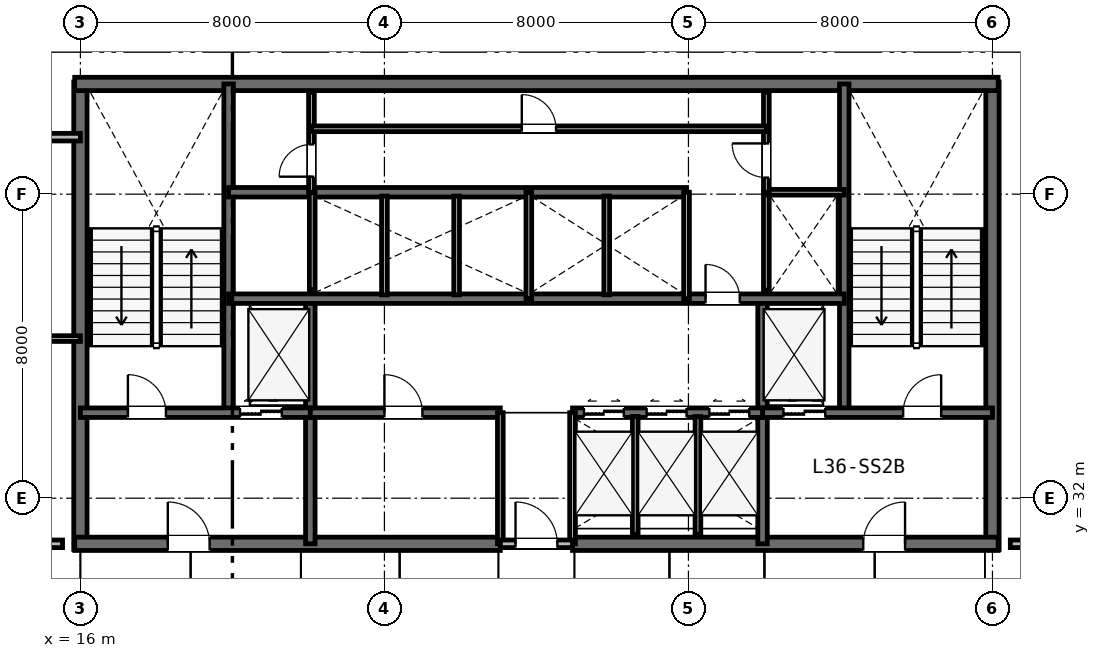
"""IFC4 building model, lengths in metres.
Left out: names, types, materials, properties, quantities, classifications, styles, units other than length and angle.
Written with IfcOpenShell. Run it as: python <this file> out.ifc"""

import sys

from ifc_helpers import new_model, si_unit, direction, frame, frame_2d, origin, place, context, subcontext, project, spatial, rectangle, extrude, element, fill, save


model = new_model("IFC4")
c1 = context("Model", 3, precision=1e-05, world=origin(), true_north=direction((0.0, 1.0)))
c2 = subcontext(c1, "Body", "Model", "MODEL_VIEW")
j1 = project(units=[si_unit("LENGTHUNIT", "METRE"), si_unit("PLANEANGLEUNIT", "RADIAN")], contexts=[c1])
p1 = place(None, origin())
s1 = spatial("IfcSite", under=j1, at=p1, CompositionType="ELEMENT")
p2 = place(p1, origin())
s2 = spatial("IfcBuilding", under=s1, at=p2, CompositionType="ELEMENT")
p3 = place(p2, frame((0.0, 0.0, 140.4)))
s3 = spatial("IfcBuildingStorey", under=s2, at=p3, CompositionType="ELEMENT", Elevation=140.4)
for number, where, z_axis, x_axis in (
    (1, (16.0, 30.65, 0.0), (0.0, 0.0, 1.0), (0.0, 1.0, 0.0)),
    (2, (40.0, 30.65, 0.0), (0.0, 0.0, 1.0), (0.0, 1.0, 0.0)),
):
    element("IfcWall", number, at=place(p3, frame(where, z_axis=z_axis, x_axis=x_axis)), inside=s3, PredefinedType="SHEAR", context=c2, shape_type="SweptSolid", body=[
        extrude(rectangle(XDim=12.3, YDim=0.35, at=frame_2d((6.15, 0.0))), origin(), (0.0, 0.0, 1.0), 3.6),
    ])
p4 = place(p3, frame((15.85, 42.9, 0.0), z_axis=(0.0, 0.0, 1.0), x_axis=(1.0, 0.0, 0.0)))
e3 = element("IfcWall", 3, at=p4, inside=s3, PredefinedType="SHEAR", context=c2, shape_type="SweptSolid", body=[
    extrude(rectangle(XDim=24.3, YDim=0.35, at=frame_2d((12.15, 0.0))), origin(), (0.0, 0.0, 1.0), 3.6),
])
p5 = place(p3, frame((15.85, 30.8, 0.0), z_axis=(0.0, 0.0, 1.0), x_axis=(1.0, 0.0, 0.0)))
e4 = element("IfcWall", 4, at=p5, inside=s3, PredefinedType="SHEAR", context=c2, shape_type="SweptSolid", body=[
    extrude(rectangle(XDim=11.2, YDim=0.35, at=frame_2d((5.6, 0.0))), origin(), (0.0, 0.0, 1.0), 3.6),
])
p6 = place(p5, frame((2.45, 0.0, 0.0)))
e5 = element("IfcOpeningElement", 5, at=p6, cuts=e4, PredefinedType="OPENING", context=c2, shape_type="SweptSolid", body=[
    extrude(rectangle(XDim=1.1, YDim=2.15, at=frame_2d((0.55, 1.075))), frame((0.0, 0.185, 0.0), z_axis=(0.0, -1.0, 0.0), x_axis=(1.0, 0.0, 0.0)), (0.0, 0.0, 1.0), 0.37),
])
p7 = place(p3, frame((28.95, 30.8, 0.0), z_axis=(0.0, 0.0, 1.0), x_axis=(1.0, 0.0, 0.0)))
e6 = element("IfcWall", 6, at=p7, inside=s3, PredefinedType="SHEAR", context=c2, shape_type="SweptSolid", body=[
    extrude(rectangle(XDim=11.2, YDim=0.35, at=frame_2d((5.6, 0.0))), origin(), (0.0, 0.0, 1.0), 3.6),
])
p8 = place(p7, frame((7.65, 0.0, 0.0)))
e7 = element("IfcOpeningElement", 7, at=p8, cuts=e6, PredefinedType="OPENING", context=c2, shape_type="SweptSolid", body=[
    extrude(rectangle(XDim=1.1, YDim=2.15, at=frame_2d((0.55, 1.075))), frame((0.0, 0.185, 0.0), z_axis=(0.0, -1.0, 0.0), x_axis=(1.0, 0.0, 0.0)), (0.0, 0.0, 1.0), 0.37),
])
for number, where, z_axis, x_axis in (
    (8, (19.9, 34.25, 0.0), (0.0, 0.0, 1.0), (0.0, 1.0, 0.0)),
    (9, (36.1, 34.25, 0.0), (0.0, 0.0, 1.0), (0.0, 1.0, 0.0)),
):
    element("IfcWall", number, at=place(p3, frame(where, z_axis=z_axis, x_axis=x_axis)), inside=s3, PredefinedType="SHEAR", context=c2, shape_type="SweptSolid", body=[
        extrude(rectangle(XDim=8.65, YDim=0.25, at=frame_2d((4.325, 0.0))), origin(), (0.0, 0.0, 1.0), 3.6),
    ])
for number, where, z_axis, x_axis in (
    (10, (22.05, 30.8, 0.0), (0.0, 0.0, 1.0), (0.0, 1.0, 0.0)),
    (11, (33.95, 30.8, 0.0), (0.0, 0.0, 1.0), (0.0, 1.0, 0.0)),
):
    element("IfcWall", number, at=place(p3, frame(where, z_axis=z_axis, x_axis=x_axis)), inside=s3, PredefinedType="SHEAR", context=c2, shape_type="SweptSolid", body=[
        extrude(rectangle(XDim=6.45, YDim=0.25, at=frame_2d((3.225, 0.0))), origin(), (0.0, 0.0, 1.0), 3.6),
    ])
p9 = place(p3, frame((16.0, 34.25, 0.0), z_axis=(0.0, 0.0, 1.0), x_axis=(1.0, 0.0, 0.0)))
e12 = element("IfcWall", 12, at=p9, inside=s3, PredefinedType="SHEAR", context=c2, shape_type="SweptSolid", body=[
    extrude(rectangle(XDim=6.05, YDim=0.25, at=frame_2d((3.025, 0.0))), origin(), (0.0, 0.0, 1.0), 3.6),
])
p10 = place(p9, frame((1.25, 0.0, 0.0)))
e13 = element("IfcOpeningElement", 13, at=p10, cuts=e12, PredefinedType="OPENING", context=c2, shape_type="SweptSolid", body=[
    extrude(rectangle(XDim=1.0, YDim=2.15, at=frame_2d((0.5, 1.075))), frame((0.0, 0.135, 0.0), z_axis=(0.0, -1.0, 0.0), x_axis=(1.0, 0.0, 0.0)), (0.0, 0.0, 1.0), 0.27),
])
p11 = place(p9, frame((4.2, 0.0, 0.0)))
e14 = element("IfcOpeningElement", 14, at=p11, cuts=e12, PredefinedType="OPENING", context=c2, shape_type="SweptSolid", body=[
    extrude(rectangle(XDim=1.1, YDim=2.15, at=frame_2d((0.55, 1.075))), frame((0.0, 0.135, 0.0), z_axis=(0.0, -1.0, 0.0), x_axis=(1.0, 0.0, 0.0)), (0.0, 0.0, 1.0), 0.27),
])
p12 = place(p3, frame((33.95, 34.25, 0.0), z_axis=(0.0, 0.0, 1.0), x_axis=(1.0, 0.0, 0.0)))
e15 = element("IfcWall", 15, at=p12, inside=s3, PredefinedType="SHEAR", context=c2, shape_type="SweptSolid", body=[
    extrude(rectangle(XDim=6.05, YDim=0.25, at=frame_2d((3.025, 0.0))), origin(), (0.0, 0.0, 1.0), 3.6),
])
p13 = place(p12, frame((3.7, 0.0, 0.0)))
e16 = element("IfcOpeningElement", 16, at=p13, cuts=e15, PredefinedType="OPENING", context=c2, shape_type="SweptSolid", body=[
    extrude(rectangle(XDim=1.0, YDim=2.15, at=frame_2d((0.5, 1.075))), frame((0.0, 0.135, 0.0), z_axis=(0.0, -1.0, 0.0), x_axis=(1.0, 0.0, 0.0)), (0.0, 0.0, 1.0), 0.27),
])
p14 = place(p12, frame((0.55, 0.0, 0.0)))
e17 = element("IfcOpeningElement", 17, at=p14, cuts=e15, PredefinedType="OPENING", context=c2, shape_type="SweptSolid", body=[
    extrude(rectangle(XDim=1.1, YDim=2.15, at=frame_2d((0.55, 1.075))), frame((0.0, 0.135, 0.0), z_axis=(0.0, -1.0, 0.0), x_axis=(1.0, 0.0, 0.0)), (0.0, 0.0, 1.0), 0.27),
])
p15 = place(p3, frame((22.05, 34.25, 0.0), z_axis=(0.0, 0.0, 1.0), x_axis=(1.0, 0.0, 0.0)))
e18 = element("IfcWall", 18, at=p15, inside=s3, PredefinedType="SHEAR", context=c2, shape_type="SweptSolid", body=[
    extrude(rectangle(XDim=5.0, YDim=0.25, at=frame_2d((2.5, 0.0))), origin(), (0.0, 0.0, 1.0), 3.6),
])
p16 = place(p15, frame((1.95, 0.0, 0.0)))
e19 = element("IfcOpeningElement", 19, at=p16, cuts=e18, PredefinedType="OPENING", context=c2, shape_type="SweptSolid", body=[
    extrude(rectangle(XDim=1.0, YDim=2.15, at=frame_2d((0.5, 1.075))), frame((0.0, 0.135, 0.0), z_axis=(0.0, -1.0, 0.0), x_axis=(1.0, 0.0, 0.0)), (0.0, 0.0, 1.0), 0.27),
])
p17 = place(p3, frame((28.95, 34.25, 0.0), z_axis=(0.0, 0.0, 1.0), x_axis=(1.0, 0.0, 0.0)))
e20 = element("IfcWall", 20, at=p17, inside=s3, PredefinedType="SHEAR", context=c2, shape_type="SweptSolid", body=[
    extrude(rectangle(XDim=5.0, YDim=0.25, at=frame_2d((2.5, 0.0))), origin(), (0.0, 0.0, 1.0), 3.6),
])
p18 = place(p17, frame((0.3, 0.0, 0.0)))
e21 = element("IfcOpeningElement", 21, at=p18, cuts=e20, PredefinedType="OPENING", context=c2, shape_type="SweptSolid", body=[
    extrude(rectangle(XDim=1.05, YDim=2.15, at=frame_2d((0.525, 1.075))), frame((0.0, 0.135, 0.0), z_axis=(0.0, -1.0, 0.0), x_axis=(1.0, 0.0, 0.0)), (0.0, 0.0, 1.0), 0.27),
])
p19 = place(p17, frame((1.95, 0.0, 0.0)))
e22 = element("IfcOpeningElement", 22, at=p19, cuts=e20, PredefinedType="OPENING", context=c2, shape_type="SweptSolid", body=[
    extrude(rectangle(XDim=1.05, YDim=2.15, at=frame_2d((0.525, 1.075))), frame((0.0, 0.135, 0.0), z_axis=(0.0, -1.0, 0.0), x_axis=(1.0, 0.0, 0.0)), (0.0, 0.0, 1.0), 0.27),
])
p20 = place(p17, frame((3.6, 0.0, 0.0)))
e23 = element("IfcOpeningElement", 23, at=p20, cuts=e20, PredefinedType="OPENING", context=c2, shape_type="SweptSolid", body=[
    extrude(rectangle(XDim=1.05, YDim=2.15, at=frame_2d((0.525, 1.075))), frame((0.0, 0.135, 0.0), z_axis=(0.0, -1.0, 0.0), x_axis=(1.0, 0.0, 0.0)), (0.0, 0.0, 1.0), 0.27),
])
p21 = place(p3, frame((19.9, 37.25, 0.0), z_axis=(0.0, 0.0, 1.0), x_axis=(1.0, 0.0, 0.0)))
e24 = element("IfcWall", 24, at=p21, inside=s3, PredefinedType="SHEAR", context=c2, shape_type="SweptSolid", body=[
    extrude(rectangle(XDim=16.2, YDim=0.25, at=frame_2d((8.1, 0.0))), origin(), (0.0, 0.0, 1.0), 3.6),
])
p22 = place(p21, frame((12.55, 0.0, 0.0)))
e25 = element("IfcOpeningElement", 25, at=p22, cuts=e24, PredefinedType="OPENING", context=c2, shape_type="SweptSolid", body=[
    extrude(rectangle(XDim=0.9, YDim=2.15, at=frame_2d((0.45, 1.075))), frame((0.0, 0.135, 0.0), z_axis=(0.0, -1.0, 0.0), x_axis=(1.0, 0.0, 0.0)), (0.0, 0.0, 1.0), 0.27),
])
p23 = place(p3, frame((19.9, 40.05, 0.0), z_axis=(0.0, 0.0, 1.0), x_axis=(1.0, 0.0, 0.0)))
e26 = element("IfcWall", 26, at=p23, inside=s3, PredefinedType="SHEAR", context=c2, shape_type="SweptSolid", body=[
    extrude(rectangle(XDim=12.05, YDim=0.25, at=frame_2d((6.025, 0.0))), origin(), (0.0, 0.0, 1.0), 3.6),
])
p24 = place(p3, frame((27.05, 30.8, 0.0), z_axis=(0.0, 0.0, 1.0), x_axis=(0.0, 1.0, 0.0)))
e27 = element("IfcWall", 27, at=p24, inside=s3, PredefinedType="PLUMBINGWALL", context=c2, shape_type="SweptSolid", body=[
    extrude(rectangle(XDim=3.45, YDim=0.15, at=frame_2d((1.725, 0.0))), origin(), (0.0, 0.0, 1.0), 2.87),
])
p25 = place(p3, frame((28.95, 30.8, 0.0), z_axis=(0.0, 0.0, 1.0), x_axis=(0.0, 1.0, 0.0)))
e28 = element("IfcWall", 28, at=p25, inside=s3, PredefinedType="PLUMBINGWALL", context=c2, shape_type="SweptSolid", body=[
    extrude(rectangle(XDim=3.45, YDim=0.15, at=frame_2d((1.725, 0.0))), origin(), (0.0, 0.0, 1.0), 3.24),
])
p26 = place(p3, frame((27.05, 30.8, 0.0), z_axis=(0.0, 0.0, 1.0), x_axis=(1.0, 0.0, 0.0)))
e29 = element("IfcWall", 29, at=p26, inside=s3, PredefinedType="PARTITIONING", context=c2, shape_type="SweptSolid", body=[
    extrude(rectangle(XDim=1.9, YDim=0.2, at=frame_2d((0.95, 0.0))), origin(), (0.0, 0.0, 1.0), 2.87),
])
p27 = place(p26, frame((0.4, 0.0, 0.0)))
e30 = element("IfcOpeningElement", 30, at=p27, cuts=e29, PredefinedType="OPENING", context=c2, shape_type="SweptSolid", body=[
    extrude(rectangle(XDim=1.1, YDim=2.15, at=frame_2d((0.55, 1.075))), frame((0.0, 0.11, 0.0), z_axis=(0.0, -1.0, 0.0), x_axis=(1.0, 0.0, 0.0)), (0.0, 0.0, 1.0), 0.22),
])
for number, where, z_axis, x_axis in (
    (31, (30.6, 31.05, 0.0), (0.0, 0.0, 1.0), (0.0, 1.0, 0.0)),
    (32, (32.25, 31.05, 0.0), (0.0, 0.0, 1.0), (0.0, 1.0, 0.0)),
):
    element("IfcWall", number, at=place(p3, frame(where, z_axis=z_axis, x_axis=x_axis)), inside=s3, PredefinedType="PLUMBINGWALL", context=c2, shape_type="SweptSolid", body=[
        extrude(rectangle(XDim=3.1, YDim=0.15, at=frame_2d((1.55, 0.0))), origin(), (0.0, 0.0, 1.0), 3.24),
    ])
p28 = place(p3, frame((22.1, 37.49, 0.0), z_axis=(0.0, 0.0, 1.0), x_axis=(0.0, 1.0, 0.0)))
e33 = element("IfcWall", 33, at=p28, inside=s3, PredefinedType="PLUMBINGWALL", context=c2, shape_type="SweptSolid", body=[
    extrude(rectangle(XDim=2.56, YDim=0.15, at=frame_2d((1.28, 0.0))), origin(), (0.0, 0.0, 1.0), 3.24),
])
p29 = place(p3, frame((27.8, 37.25, 0.0), z_axis=(0.0, 0.0, 1.0), x_axis=(0.0, 1.0, 0.0)))
e34 = element("IfcWall", 34, at=p29, inside=s3, PredefinedType="PLUMBINGWALL", context=c2, shape_type="SweptSolid", body=[
    extrude(rectangle(XDim=2.8, YDim=0.15, at=frame_2d((1.4, 0.0))), origin(), (0.0, 0.0, 1.0), 3.24),
])
for number, where, z_axis, x_axis in (
    (35, (24.0, 37.35, 0.0), (0.0, 0.0, 1.0), (0.0, 1.0, 0.0)),
    (36, (25.9, 37.35, 0.0), (0.0, 0.0, 1.0), (0.0, 1.0, 0.0)),
):
    element("IfcWall", number, at=place(p3, frame(where, z_axis=z_axis, x_axis=x_axis)), inside=s3, PredefinedType="PLUMBINGWALL", context=c2, shape_type="SweptSolid", body=[
        extrude(rectangle(XDim=2.6, YDim=0.15, at=frame_2d((1.3, 0.0))), origin(), (0.0, 0.0, 1.0), 3.24),
    ])
p30 = place(p3, frame((31.95, 37.25, 0.0), z_axis=(0.0, 0.0, 1.0), x_axis=(0.0, 1.0, 0.0)))
e37 = element("IfcWall", 37, at=p30, inside=s3, PredefinedType="PLUMBINGWALL", context=c2, shape_type="SweptSolid", body=[
    extrude(rectangle(XDim=2.8, YDim=0.15, at=frame_2d((1.4, 0.0))), origin(), (0.0, 0.0, 1.0), 3.24),
])
p31 = place(p3, frame((29.85, 37.35, 0.0), z_axis=(0.0, 0.0, 1.0), x_axis=(0.0, 1.0, 0.0)))
e38 = element("IfcWall", 38, at=p31, inside=s3, PredefinedType="PLUMBINGWALL", context=c2, shape_type="SweptSolid", body=[
    extrude(rectangle(XDim=2.6, YDim=0.15, at=frame_2d((1.3, 0.0))), origin(), (0.0, 0.0, 1.0), 3.24),
])
p32 = place(p3, frame((34.05, 37.473, 0.0), z_axis=(0.0, 0.0, 1.0), x_axis=(0.0, 1.0, 0.0)))
e39 = element("IfcWall", 39, at=p32, inside=s3, PredefinedType="PLUMBINGWALL", context=c2, shape_type="SweptSolid", body=[
    extrude(rectangle(XDim=2.577, YDim=0.15, at=frame_2d((1.288, 0.0))), origin(), (0.0, 0.0, 1.0), 3.24),
])
p33 = place(p3, frame((34.05, 40.05, 0.0), z_axis=(0.0, 0.0, 1.0), x_axis=(1.0, 0.0, 0.0)))
e40 = element("IfcWall", 40, at=p33, inside=s3, PredefinedType="PARTITIONING", context=c2, shape_type="SweptSolid", body=[
    extrude(rectangle(XDim=2.05, YDim=0.15, at=frame_2d((1.025, 0.0))), origin(), (0.0, 0.0, 1.0), 3.24),
])
p34 = place(p3, frame((34.05, 40.05, 0.0), z_axis=(0.0, 0.0, 1.0), x_axis=(0.0, 1.0, 0.0)))
e41 = element("IfcWall", 41, at=p34, inside=s3, PredefinedType="PARTITIONING", context=c2, shape_type="SweptSolid", body=[
    extrude(rectangle(XDim=2.63, YDim=0.15, at=frame_2d((1.315, 0.0))), origin(), (0.0, 0.0, 1.0), 3.24),
])
p35 = place(p34, frame((0.385, 0.0, 0.0)))
e42 = element("IfcOpeningElement", 42, at=p35, cuts=e41, PredefinedType="OPENING", context=c2, shape_type="SweptSolid", body=[
    extrude(rectangle(XDim=0.9, YDim=2.15, at=frame_2d((0.45, 1.075))), frame((0.0, 0.085, 0.0), z_axis=(0.0, -1.0, 0.0), x_axis=(1.0, 0.0, 0.0)), (0.0, 0.0, 1.0), 0.17),
])
p36 = place(p3, frame((22.08, 40.05, 0.0), z_axis=(0.0, 0.0, 1.0), x_axis=(0.0, 1.0, 0.0)))
e43 = element("IfcWall", 43, at=p36, inside=s3, PredefinedType="PARTITIONING", context=c2, shape_type="SweptSolid", body=[
    extrude(rectangle(XDim=2.63, YDim=0.15, at=frame_2d((1.315, 0.0))), origin(), (0.0, 0.0, 1.0), 3.24),
])
p37 = place(p36, frame((0.41, 0.0, 0.0)))
e44 = element("IfcOpeningElement", 44, at=p37, cuts=e43, PredefinedType="OPENING", context=c2, shape_type="SweptSolid", body=[
    extrude(rectangle(XDim=0.85, YDim=2.15, at=frame_2d((0.425, 1.075))), frame((0.0, 0.085, 0.0), z_axis=(0.0, -1.0, 0.0), x_axis=(1.0, 0.0, 0.0)), (0.0, 0.0, 1.0), 0.17),
])
p38 = place(p3, frame((22.08, 41.72, 0.0), z_axis=(0.0, 0.0, 1.0), x_axis=(1.0, 0.0, 0.0)))
e45 = element("IfcWall", 45, at=p38, inside=s3, PredefinedType="PARTITIONING", context=c2, shape_type="SweptSolid", body=[
    extrude(rectangle(XDim=11.97, YDim=0.15, at=frame_2d((5.985, 0.0))), origin(), (0.0, 0.0, 1.0), 3.24),
])
p39 = place(p38, frame((5.535, 0.0, 0.0)))
e46 = element("IfcOpeningElement", 46, at=p39, cuts=e45, PredefinedType="OPENING", context=c2, shape_type="SweptSolid", body=[
    extrude(rectangle(XDim=0.9, YDim=2.15, at=frame_2d((0.45, 1.075))), frame((0.0, 0.085, 0.0), z_axis=(0.0, -1.0, 0.0), x_axis=(1.0, 0.0, 0.0)), (0.0, 0.0, 1.0), 0.17),
])
p40 = place(p3, frame((11.4, 30.8, 0.0), z_axis=(0.0, 0.0, 1.0), x_axis=(1.0, 0.0, 0.0)))
e47 = element("IfcWall", 47, at=p40, inside=s3, PredefinedType="PARTITIONING", context=c2, shape_type="SweptSolid", body=[
    extrude(rectangle(XDim=4.13, YDim=0.2, at=frame_2d((2.065, 0.0))), origin(), (0.0, 0.0, 1.0), 2.84),
])
p41 = place(p3, frame((40.47, 30.8, 0.0), z_axis=(0.0, 0.0, 1.0), x_axis=(1.0, 0.0, 0.0)))
e48 = element("IfcWall", 48, at=p41, inside=s3, PredefinedType="PARTITIONING", context=c2, shape_type="SweptSolid", body=[
    extrude(rectangle(XDim=1.73, YDim=0.2, at=frame_2d((0.865, 0.0))), origin(), (0.0, 0.0, 1.0), 2.84),
])
p42 = place(p3, frame((0.1, 41.5, 0.0), z_axis=(0.0, 0.0, 1.0), x_axis=(1.0, 0.0, 0.0)))
e49 = element("IfcWall", 49, at=p42, inside=s3, PredefinedType="PARTITIONING", context=c2, shape_type="SweptSolid", body=[
    extrude(rectangle(XDim=15.9, YDim=0.2, at=frame_2d((7.95, 0.0))), origin(), (0.0, 0.0, 1.0), 2.84),
])
p43 = place(p42, frame((9.877, 0.0, 0.0)))
e50 = element("IfcOpeningElement", 50, at=p43, cuts=e49, PredefinedType="OPENING", context=c2, shape_type="SweptSolid", body=[
    extrude(rectangle(XDim=0.95, YDim=2.15, at=frame_2d((0.475, 1.075))), frame((0.0, 0.11, 0.0), z_axis=(0.0, -1.0, 0.0), x_axis=(1.0, 0.0, 0.0)), (0.0, 0.0, 1.0), 0.22),
])
p44 = place(p3, frame((11.4, 36.2, 0.0), z_axis=(0.0, 0.0, 1.0), x_axis=(1.0, 0.0, 0.0)))
e51 = element("IfcWall", 51, at=p44, inside=s3, PredefinedType="PARTITIONING", context=c2, shape_type="SweptSolid", body=[
    extrude(rectangle(XDim=4.6, YDim=0.15, at=frame_2d((2.3, 0.0))), origin(), (0.0, 0.0, 1.0), 3.24),
])
p45 = place(p27, origin())
e52 = element("IfcDoor", 52, at=p45, inside=s3, OperationType="SINGLE_SWING_LEFT", PredefinedType="DOOR", context=c2, shape_type="SweptSolid", body=[
    extrude(rectangle(XDim=1.1, YDim=2.15, at=frame_2d((0.55, 1.075))), frame((0.0, 0.025, 0.0), z_axis=(0.0, -1.0, 0.0), x_axis=(1.0, 0.0, 0.0)), (0.0, 0.0, 1.0), 0.05),
])
fill(e30, e52)
p46 = place(p10, origin())
e53 = element("IfcDoor", 53, at=p46, inside=s3, OperationType="SINGLE_SWING_LEFT", PredefinedType="DOOR", context=c2, shape_type="SweptSolid", body=[
    extrude(rectangle(XDim=1.0, YDim=2.15, at=frame_2d((0.5, 1.075))), frame((0.0, 0.025, 0.0), z_axis=(0.0, -1.0, 0.0), x_axis=(1.0, 0.0, 0.0)), (0.0, 0.0, 1.0), 0.05),
])
fill(e13, e53)
p47 = place(p13, origin())
e54 = element("IfcDoor", 54, at=p47, inside=s3, OperationType="SINGLE_SWING_RIGHT", PredefinedType="DOOR", context=c2, shape_type="SweptSolid", body=[
    extrude(rectangle(XDim=1.0, YDim=2.15, at=frame_2d((0.5, 1.075))), frame((0.0, 0.025, 0.0), z_axis=(0.0, -1.0, 0.0), x_axis=(1.0, 0.0, 0.0)), (0.0, 0.0, 1.0), 0.05),
])
fill(e16, e54)
p48 = place(p6, origin())
e55 = element("IfcDoor", 55, at=p48, inside=s3, OperationType="SINGLE_SWING_LEFT", PredefinedType="DOOR", context=c2, shape_type="SweptSolid", body=[
    extrude(rectangle(XDim=1.1, YDim=2.15, at=frame_2d((0.55, 1.075))), frame((0.0, 0.025, 0.0), z_axis=(0.0, -1.0, 0.0), x_axis=(1.0, 0.0, 0.0)), (0.0, 0.0, 1.0), 0.05),
])
fill(e5, e55)
p49 = place(p8, origin())
e56 = element("IfcDoor", 56, at=p49, inside=s3, OperationType="SINGLE_SWING_RIGHT", PredefinedType="DOOR", context=c2, shape_type="SweptSolid", body=[
    extrude(rectangle(XDim=1.1, YDim=2.15, at=frame_2d((0.55, 1.075))), frame((0.0, 0.025, 0.0), z_axis=(0.0, -1.0, 0.0), x_axis=(1.0, 0.0, 0.0)), (0.0, 0.0, 1.0), 0.05),
])
fill(e7, e56)
p50 = place(p16, origin())
e57 = element("IfcDoor", 57, at=p50, inside=s3, OperationType="SINGLE_SWING_LEFT", PredefinedType="DOOR", context=c2, shape_type="SweptSolid", body=[
    extrude(rectangle(XDim=1.0, YDim=2.15, at=frame_2d((0.5, 1.075))), frame((0.0, 0.025, 0.0), z_axis=(0.0, -1.0, 0.0), x_axis=(1.0, 0.0, 0.0)), (0.0, 0.0, 1.0), 0.05),
])
fill(e19, e57)
p51 = place(p22, origin())
e58 = element("IfcDoor", 58, at=p51, inside=s3, OperationType="SINGLE_SWING_LEFT", PredefinedType="DOOR", context=c2, shape_type="SweptSolid", body=[
    extrude(rectangle(XDim=0.9, YDim=2.15, at=frame_2d((0.45, 1.075))), frame((0.0, 0.025, 0.0), z_axis=(0.0, -1.0, 0.0), x_axis=(1.0, 0.0, 0.0)), (0.0, 0.0, 1.0), 0.05),
])
fill(e25, e58)
p52 = place(p35, origin())
e59 = element("IfcDoor", 59, at=p52, inside=s3, OperationType="SINGLE_SWING_RIGHT", PredefinedType="DOOR", context=c2, shape_type="SweptSolid", body=[
    extrude(rectangle(XDim=0.9, YDim=2.15, at=frame_2d((0.45, 1.075))), frame((0.0, 0.025, 0.0), z_axis=(0.0, -1.0, 0.0), x_axis=(1.0, 0.0, 0.0)), (0.0, 0.0, 1.0), 0.05),
])
fill(e42, e59)
p53 = place(p37, origin())
e60 = element("IfcDoor", 60, at=p53, inside=s3, OperationType="SINGLE_SWING_LEFT", PredefinedType="DOOR", context=c2, shape_type="SweptSolid", body=[
    extrude(rectangle(XDim=0.85, YDim=2.15, at=frame_2d((0.425, 1.075))), frame((0.0, 0.025, 0.0), z_axis=(0.0, -1.0, 0.0), x_axis=(1.0, 0.0, 0.0)), (0.0, 0.0, 1.0), 0.05),
])
fill(e44, e60)
p54 = place(p39, origin())
e61 = element("IfcDoor", 61, at=p54, inside=s3, OperationType="SINGLE_SWING_LEFT", PredefinedType="DOOR", context=c2, shape_type="SweptSolid", body=[
    extrude(rectangle(XDim=0.9, YDim=2.15, at=frame_2d((0.45, 1.075))), frame((0.0, 0.025, 0.0), z_axis=(0.0, -1.0, 0.0), x_axis=(1.0, 0.0, 0.0)), (0.0, 0.0, 1.0), 0.05),
])
fill(e46, e61)
p55 = place(p11, origin())
e62 = element("IfcDoor", 62, at=p55, inside=s3, OperationType="DOUBLE_DOOR_SLIDING", PredefinedType="DOOR", context=c2, shape_type="SweptSolid", body=[
    extrude(rectangle(XDim=1.1, YDim=2.15, at=frame_2d((0.55, 1.075))), frame((0.0, 0.025, 0.0), z_axis=(0.0, -1.0, 0.0), x_axis=(1.0, 0.0, 0.0)), (0.0, 0.0, 1.0), 0.05),
])
fill(e14, e62)
p56 = place(p14, origin())
e63 = element("IfcDoor", 63, at=p56, inside=s3, OperationType="DOUBLE_DOOR_SLIDING", PredefinedType="DOOR", context=c2, shape_type="SweptSolid", body=[
    extrude(rectangle(XDim=1.1, YDim=2.15, at=frame_2d((0.55, 1.075))), frame((0.0, 0.025, 0.0), z_axis=(0.0, -1.0, 0.0), x_axis=(1.0, 0.0, 0.0)), (0.0, 0.0, 1.0), 0.05),
])
fill(e17, e63)
p57 = place(p18, origin())
e64 = element("IfcDoor", 64, at=p57, inside=s3, OperationType="DOUBLE_DOOR_SLIDING", PredefinedType="DOOR", context=c2, shape_type="SweptSolid", body=[
    extrude(rectangle(XDim=1.05, YDim=2.15, at=frame_2d((0.525, 1.075))), frame((0.0, 0.025, 0.0), z_axis=(0.0, -1.0, 0.0), x_axis=(1.0, 0.0, 0.0)), (0.0, 0.0, 1.0), 0.05),
])
fill(e21, e64)
p58 = place(p19, origin())
e65 = element("IfcDoor", 65, at=p58, inside=s3, OperationType="DOUBLE_DOOR_SLIDING", PredefinedType="DOOR", context=c2, shape_type="SweptSolid", body=[
    extrude(rectangle(XDim=1.05, YDim=2.15, at=frame_2d((0.525, 1.075))), frame((0.0, 0.025, 0.0), z_axis=(0.0, -1.0, 0.0), x_axis=(1.0, 0.0, 0.0)), (0.0, 0.0, 1.0), 0.05),
])
fill(e22, e65)
p59 = place(p20, origin())
e66 = element("IfcDoor", 66, at=p59, inside=s3, OperationType="DOUBLE_DOOR_SLIDING", PredefinedType="DOOR", context=c2, shape_type="SweptSolid", body=[
    extrude(rectangle(XDim=1.05, YDim=2.15, at=frame_2d((0.525, 1.075))), frame((0.0, 0.025, 0.0), z_axis=(0.0, -1.0, 0.0), x_axis=(1.0, 0.0, 0.0)), (0.0, 0.0, 1.0), 0.05),
])
fill(e23, e66)
save(model, sys.argv[1])
